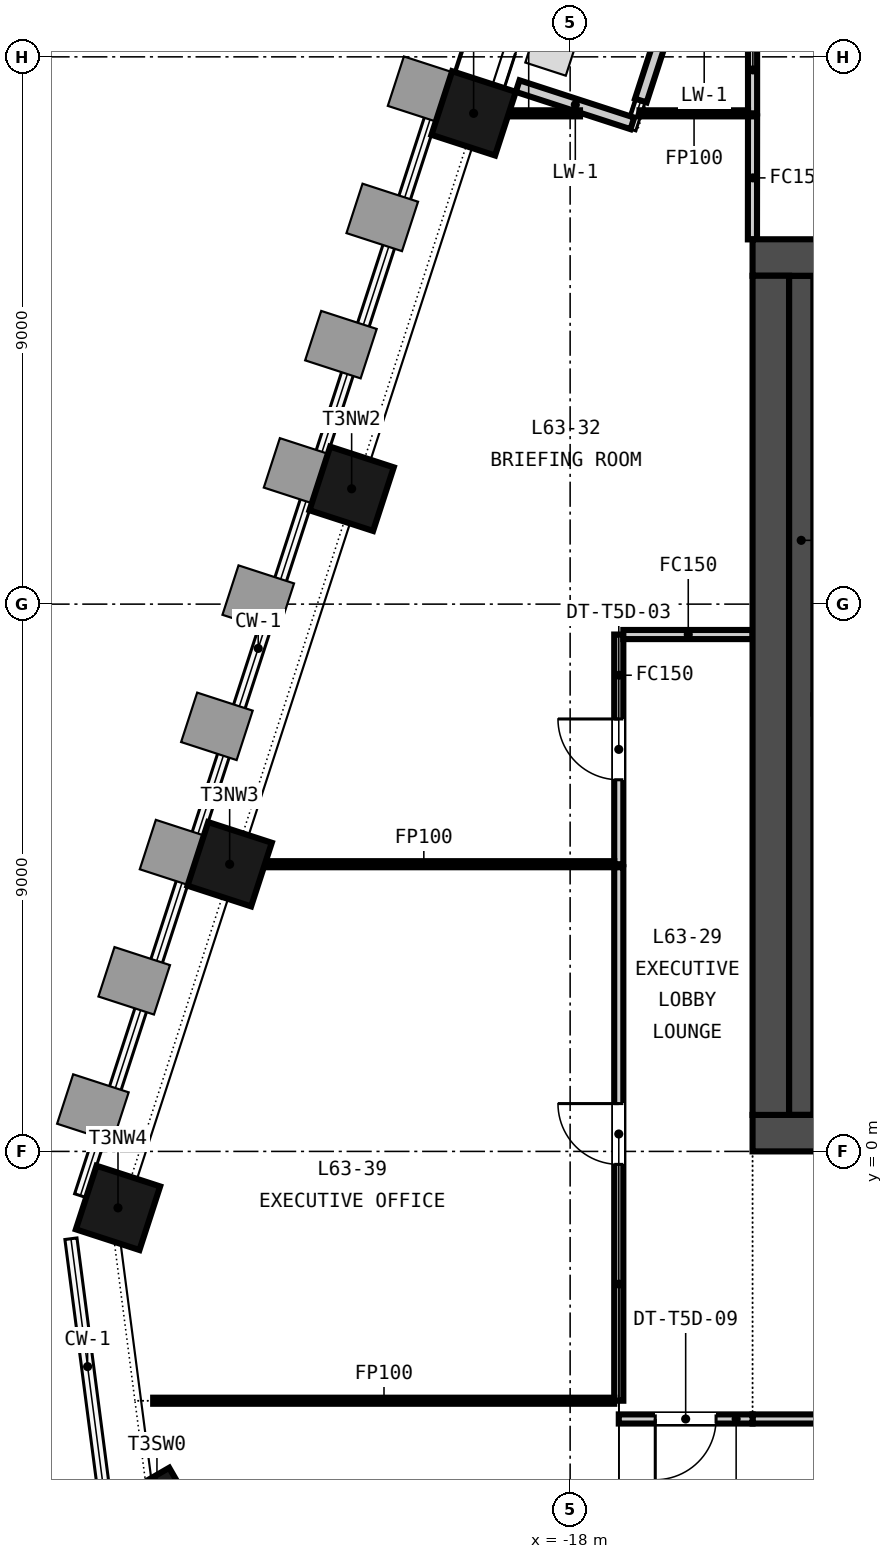
"""IFC4 building model, lengths in metres.
Left out: names, types, materials, properties, quantities, classifications, styles, units other than length and angle.
Written with IfcOpenShell. Run it as: python <this file> out.ifc"""

import sys

from ifc_helpers import new_model, si_unit, direction, frame, frame_2d, origin, origin_2d, place, context, subcontext, project, spatial, rectangle, extrude, element, fill, save


model = new_model("IFC4")
c1 = context("Model", 3, precision=1e-05, world=origin(), true_north=direction((0.0, 1.0)))
c2 = subcontext(c1, "Body", "Model", "MODEL_VIEW")
j1 = project(units=[si_unit("LENGTHUNIT", "METRE"), si_unit("PLANEANGLEUNIT", "RADIAN")], contexts=[c1])
p1 = place(None, origin())
s1 = spatial("IfcSite", under=j1, at=p1, CompositionType="ELEMENT")
p2 = place(p1, origin())
s2 = spatial("IfcBuilding", under=s1, at=p2, CompositionType="ELEMENT")
p3 = place(p2, frame((0.0, 0.0, 249.15)))
s3 = spatial("IfcBuildingStorey", under=s2, at=p3, CompositionType="ELEMENT", Elevation=249.15)
p4 = place(p3, frame((-15.0, 0.3, -0.15), z_axis=(0.0, 0.0, 1.0), x_axis=(1.0, 0.0, 0.0)))
e1 = element("IfcWall", 1, at=p4, inside=s3, PredefinedType="SOLIDWALL", context=c2, shape_type="SweptSolid", body=[
    extrude(rectangle(XDim=30.0, YDim=0.6, at=frame_2d((15.0, 0.0))), origin(), (0.0, 0.0, 1.0), 3.65),
])
p5 = place(p4, frame((5.8, 0.0, 0.15)))
e2 = element("IfcOpeningElement", 2, at=p5, cuts=e1, PredefinedType="OPENING", context=c2, shape_type="SweptSolid", body=[
    extrude(rectangle(XDim=2.4, YDim=2.4, at=frame_2d((1.2, 1.2))), frame((0.0, 0.31, 0.0), z_axis=(0.0, -1.0, 0.0), x_axis=(1.0, 0.0, 0.0)), (0.0, 0.0, 1.0), 0.62),
])
p6 = place(p4, frame((13.8, 0.0, 0.15)))
e3 = element("IfcOpeningElement", 3, at=p6, cuts=e1, PredefinedType="OPENING", context=c2, shape_type="SweptSolid", body=[
    extrude(rectangle(XDim=2.4, YDim=2.4, at=frame_2d((1.2, 1.2))), frame((0.0, 0.31, 0.0), z_axis=(0.0, -1.0, 0.0), x_axis=(1.0, 0.0, 0.0)), (0.0, 0.0, 1.0), 0.62),
])
p7 = place(p4, frame((21.8, 0.0, 0.15)))
e4 = element("IfcOpeningElement", 4, at=p7, cuts=e1, PredefinedType="OPENING", context=c2, shape_type="SweptSolid", body=[
    extrude(rectangle(XDim=2.4, YDim=2.4, at=frame_2d((1.2, 1.2))), frame((0.0, 0.31, 0.0), z_axis=(0.0, -1.0, 0.0), x_axis=(1.0, 0.0, 0.0)), (0.0, 0.0, 1.0), 0.62),
])
p8 = place(p4, frame((1.5, 0.0, 0.15)))
e5 = element("IfcOpeningElement", 5, at=p8, cuts=e1, PredefinedType="OPENING", context=c2, shape_type="SweptSolid", body=[
    extrude(rectangle(XDim=1.2, YDim=2.1, at=frame_2d((0.6, 1.05))), frame((0.0, 0.31, 0.0), z_axis=(0.0, -1.0, 0.0), x_axis=(1.0, 0.0, 0.0)), (0.0, 0.0, 1.0), 0.62),
])
p9 = place(p4, frame((27.3, 0.0, 0.15)))
e6 = element("IfcOpeningElement", 6, at=p9, cuts=e1, PredefinedType="OPENING", context=c2, shape_type="SweptSolid", body=[
    extrude(rectangle(XDim=1.2, YDim=2.1, at=frame_2d((0.6, 1.05))), frame((0.0, 0.31, 0.0), z_axis=(0.0, -1.0, 0.0), x_axis=(1.0, 0.0, 0.0)), (0.0, 0.0, 1.0), 0.62),
])
p10 = place(p3, frame((-15.0, 14.7, -0.15), z_axis=(0.0, 0.0, 1.0), x_axis=(1.0, 0.0, 0.0)))
e7 = element("IfcWall", 7, at=p10, inside=s3, PredefinedType="SOLIDWALL", context=c2, shape_type="SweptSolid", body=[
    extrude(rectangle(XDim=30.0, YDim=0.6, at=frame_2d((15.0, 0.0))), origin(), (0.0, 0.0, 1.0), 3.65),
])
p11 = place(p10, frame((9.25, 0.0, 0.15)))
e8 = element("IfcOpeningElement", 8, at=p11, cuts=e7, PredefinedType="OPENING", context=c2, shape_type="SweptSolid", body=[
    extrude(rectangle(XDim=1.5, YDim=2.1, at=frame_2d((0.75, 1.05))), frame((0.0, 0.31, 0.0), z_axis=(0.0, -1.0, 0.0), x_axis=(1.0, 0.0, 0.0)), (0.0, 0.0, 1.0), 0.62),
])
p12 = place(p10, frame((19.4, 0.0, 0.15)))
e9 = element("IfcOpeningElement", 9, at=p12, cuts=e7, PredefinedType="OPENING", context=c2, shape_type="SweptSolid", body=[
    extrude(rectangle(XDim=1.5, YDim=2.1, at=frame_2d((0.75, 1.05))), frame((0.0, 0.31, 0.0), z_axis=(0.0, -1.0, 0.0), x_axis=(1.0, 0.0, 0.0)), (0.0, 0.0, 1.0), 0.62),
])
p13 = place(p10, frame((1.5, 0.0, 0.15)))
e10 = element("IfcOpeningElement", 10, at=p13, cuts=e7, PredefinedType="OPENING", context=c2, shape_type="SweptSolid", body=[
    extrude(rectangle(XDim=1.2, YDim=2.1, at=frame_2d((0.6, 1.05))), frame((0.0, 0.31, 0.0), z_axis=(0.0, -1.0, 0.0), x_axis=(1.0, 0.0, 0.0)), (0.0, 0.0, 1.0), 0.62),
])
p14 = place(p10, frame((27.3, 0.0, 0.15)))
e11 = element("IfcOpeningElement", 11, at=p14, cuts=e7, PredefinedType="OPENING", context=c2, shape_type="SweptSolid", body=[
    extrude(rectangle(XDim=1.2, YDim=2.1, at=frame_2d((0.6, 1.05))), frame((0.0, 0.31, 0.0), z_axis=(0.0, -1.0, 0.0), x_axis=(1.0, 0.0, 0.0)), (0.0, 0.0, 1.0), 0.62),
])
p15 = place(p3, frame((-14.7, 0.6, -0.15), z_axis=(0.0, 0.0, 1.0), x_axis=(0.0, 1.0, 0.0)))
e12 = element("IfcWall", 12, at=p15, inside=s3, PredefinedType="SOLIDWALL", context=c2, shape_type="SweptSolid", body=[
    extrude(rectangle(XDim=13.8, YDim=0.6, at=frame_2d((6.9, 0.0))), origin(), (0.0, 0.0, 1.0), 3.65),
])
for number, where, z_axis, x_axis in (
    (13, (-19.587, 17.071, -0.15), (0.0, 0.0, 1.0), (-0.309, -0.951, 0.0)),
    (14, (-21.593, 10.897, -0.15), (0.0, 0.0, 1.0), (-0.309, -0.951, 0.0)),
    (15, (-23.599, 4.723, -0.15), (0.0, 0.0, 1.0), (-0.309, -0.951, 0.0)),
    (16, (-25.436, -0.928, -0.15), (0.0, 0.0, 1.0), (-0.309, -0.951, 0.0)),
    (17, (-24.795, -5.954, -0.15), (0.0, 0.0, 1.0), (0.5, -0.866, 0.0)),
):
    element("IfcColumn", number, at=place(p3, frame(where, z_axis=z_axis, x_axis=x_axis)), inside=s3, PredefinedType="COLUMN", context=c2, shape_type="SweptSolid", body=[
        extrude(rectangle(XDim=1.1, YDim=1.1, at=origin_2d()), origin(), (0.0, 0.0, 1.0), 3.65),
    ])
p16 = place(p3, frame((-15.65, 20.935, 0.0), z_axis=(0.0, 0.0, 1.0), x_axis=(-0.308973988745, -0.951070488596, 0.0)))
e18 = element("IfcWall", 18, at=p16, inside=s3, PredefinedType="SOLIDWALL", context=c2, shape_type="SweptSolid", body=[
    extrude(rectangle(XDim=3.842, YDim=0.2, at=frame_2d((1.921, 0.0))), origin(), (0.0, 0.0, 1.0), 3.05),
])
p17 = place(p16, frame((1.021, 0.0, 0.0)))
e19 = element("IfcOpeningElement", 19, at=p17, cuts=e18, PredefinedType="OPENING", context=c2, shape_type="SweptSolid", body=[
    extrude(rectangle(XDim=1.8, YDim=2.4, at=frame_2d((0.9, 1.2))), frame((0.0, 0.11, 0.0), z_axis=(0.0, -1.0, 0.0), x_axis=(1.0, 0.0, 0.0)), (0.0, 0.0, 1.0), 0.22),
])
p18 = place(p3, frame((-18.863, 17.519, 0.0), z_axis=(0.0, 0.0, 1.0), x_axis=(0.951067521568, -0.308983121576, 0.0)))
e20 = element("IfcWall", 20, at=p18, inside=s3, PredefinedType="SOLIDWALL", context=c2, shape_type="SweptSolid", body=[
    extrude(rectangle(XDim=1.984, YDim=0.2, at=frame_2d((0.992, 0.0))), origin(), (0.0, 0.0, 1.0), 2.9),
])
p19 = place(p3, frame((-14.2, 0.6, 0.0), z_axis=(0.0, 0.0, 1.0), x_axis=(0.0, 1.0, 0.0)))
e21 = element("IfcWall", 21, at=p19, inside=s3, PredefinedType="SOLIDWALL", context=c2, shape_type="SweptSolid", body=[
    extrude(rectangle(XDim=13.8, YDim=0.4, at=frame_2d((6.9, 0.0))), origin(), (0.0, 0.0, 1.0), 3.5),
])
p20 = place(p3, frame((-0.867, -4.4, 0.0), z_axis=(0.0, 0.0, 1.0), x_axis=(-1.0, 0.0, 0.0)))
e22 = element("IfcWall", 22, at=p20, inside=s3, PredefinedType="PARTITIONING", context=c2, shape_type="SweptSolid", body=[
    extrude(rectangle(XDim=14.133, YDim=0.15, at=frame_2d((7.066, 0.0))), origin(), (0.0, 0.0, 1.0), 2.751),
])
p21 = place(p20, frame((6.167, 0.0, 0.0)))
e23 = element("IfcOpeningElement", 23, at=p21, cuts=e22, PredefinedType="OPENING", context=c2, shape_type="SweptSolid", body=[
    extrude(rectangle(XDim=1.8, YDim=2.1, at=frame_2d((0.9, 1.05))), frame((0.0, 0.085, 0.0), z_axis=(0.0, -1.0, 0.0), x_axis=(1.0, 0.0, 0.0)), (0.0, 0.0, 1.0), 0.17),
])
p22 = place(p3, frame((-15.0, -4.4, 0.0), z_axis=(0.0, 0.0, 1.0), x_axis=(-1.0, 0.0, 0.0)))
e24 = element("IfcWall", 24, at=p22, inside=s3, PredefinedType="PARTITIONING", context=c2, shape_type="SweptSolid", body=[
    extrude(rectangle(XDim=2.2, YDim=0.15, at=frame_2d((1.1, 0.0))), origin(), (0.0, 0.0, 1.0), 2.751),
])
p23 = place(p22, frame((0.6, 0.0, 0.0)))
e25 = element("IfcOpeningElement", 25, at=p23, cuts=e24, PredefinedType="OPENING", context=c2, shape_type="SweptSolid", body=[
    extrude(rectangle(XDim=1.0, YDim=2.1, at=frame_2d((0.5, 1.05))), frame((0.0, 0.085, 0.0), z_axis=(0.0, -1.0, 0.0), x_axis=(1.0, 0.0, 0.0)), (0.0, 0.0, 1.0), 0.17),
])
p24 = place(p3, frame((-15.0, 17.071, 0.0), z_axis=(0.0, 0.0, 1.0), x_axis=(0.0, 1.0, 0.0)))
e26 = element("IfcWall", 26, at=p24, inside=s3, PredefinedType="PARTITIONING", context=c2, shape_type="SweptSolid", body=[
    extrude(rectangle(XDim=1.429, YDim=0.15, at=frame_2d((0.714, 0.0))), origin(), (0.0, 0.0, 1.0), 2.751),
])
p25 = place(p3, frame((-19.535, 17.071, 0.0), z_axis=(0.0, 0.0, 1.0), x_axis=(1.0, 0.0, 0.0)))
e27 = element("IfcWall", 27, at=p25, inside=s3, PredefinedType="PARTITIONING", context=c2, shape_type="SweptSolid", body=[
    extrude(rectangle(XDim=1.697, YDim=0.1, at=frame_2d((0.849, 0.0))), origin(), (0.0, 0.0, 1.0), 2.751),
])
p26 = place(p3, frame((-16.859, 17.071, 0.0), z_axis=(0.0, 0.0, 1.0), x_axis=(1.0, 0.0, 0.0)))
e28 = element("IfcWall", 28, at=p26, inside=s3, PredefinedType="PARTITIONING", context=c2, shape_type="SweptSolid", body=[
    extrude(rectangle(XDim=1.784, YDim=0.1, at=frame_2d((0.892, 0.0))), origin(), (0.0, 0.0, 1.0), 2.751),
])
p27 = place(p3, frame((-15.002, 14.998, 0.0), z_axis=(0.0, 0.0, 1.0), x_axis=(0.000965483499, 0.999999533921, 0.0)))
e29 = element("IfcWall", 29, at=p27, inside=s3, PredefinedType="PARTITIONING", context=c2, shape_type="SweptSolid", body=[
    extrude(rectangle(XDim=2.023, YDim=0.15, at=frame_2d((1.011, 0.0))), origin(), (0.0, 0.0, 1.0), 2.751),
])
p28 = place(p3, frame((-17.2, 4.723, 0.0), z_axis=(0.0, 0.0, 1.0), x_axis=(0.0, 1.0, 0.0)))
e30 = element("IfcWall", 30, at=p28, inside=s3, PredefinedType="PARTITIONING", context=c2, shape_type="SweptSolid", body=[
    extrude(rectangle(XDim=3.777, YDim=0.15, at=frame_2d((1.889, 0.0))), origin(), (0.0, 0.0, 1.0), 2.751),
])
p29 = place(p28, frame((1.388, 0.0, 0.0)))
e31 = element("IfcOpeningElement", 31, at=p29, cuts=e30, PredefinedType="OPENING", context=c2, shape_type="SweptSolid", body=[
    extrude(rectangle(XDim=1.0, YDim=2.1, at=frame_2d((0.5, 1.05))), frame((0.0, 0.085, 0.0), z_axis=(0.0, -1.0, 0.0), x_axis=(1.0, 0.0, 0.0)), (0.0, 0.0, 1.0), 0.17),
])
p30 = place(p3, frame((-17.125, 8.5, 0.0), z_axis=(0.0, 0.0, 1.0), x_axis=(1.0, 0.0, 0.0)))
e32 = element("IfcWall", 32, at=p30, inside=s3, PredefinedType="PARTITIONING", context=c2, shape_type="SweptSolid", body=[
    extrude(rectangle(XDim=2.125, YDim=0.15, at=frame_2d((1.062, 0.0))), origin(), (0.0, 0.0, 1.0), 2.751),
])
p31 = place(p3, frame((-23.547, 4.723, 0.0), z_axis=(0.0, 0.0, 1.0), x_axis=(1.0, 0.0, 0.0)))
e33 = element("IfcWall", 33, at=p31, inside=s3, PredefinedType="PARTITIONING", context=c2, shape_type="SweptSolid", body=[
    extrude(rectangle(XDim=6.272, YDim=0.1, at=frame_2d((3.136, 0.0))), origin(), (0.0, 0.0, 1.0), 2.751),
])
p32 = place(p3, frame((-17.2, -4.1, 0.0), z_axis=(0.0, 0.0, 1.0), x_axis=(0.0, 1.0, 0.0)))
e34 = element("IfcWall", 34, at=p32, inside=s3, PredefinedType="PARTITIONING", context=c2, shape_type="SweptSolid", body=[
    extrude(rectangle(XDim=8.773, YDim=0.15, at=frame_2d((4.387, 0.0))), origin(), (0.0, 0.0, 1.0), 2.751),
])
p33 = place(p32, frame((3.886, 0.0, 0.0)))
e35 = element("IfcOpeningElement", 35, at=p33, cuts=e34, PredefinedType="OPENING", context=c2, shape_type="SweptSolid", body=[
    extrude(rectangle(XDim=1.0, YDim=2.1, at=frame_2d((0.5, 1.05))), frame((0.0, 0.085, 0.0), z_axis=(0.0, -1.0, 0.0), x_axis=(1.0, 0.0, 0.0)), (0.0, 0.0, 1.0), 0.17),
])
p34 = place(p3, frame((-24.857, -4.1, 0.0), z_axis=(0.0, 0.0, 1.0), x_axis=(1.0, 0.0, 0.0)))
e36 = element("IfcWall", 36, at=p34, inside=s3, PredefinedType="PARTITIONING", context=c2, shape_type="SweptSolid", body=[
    extrude(rectangle(XDim=7.582, YDim=0.1, at=frame_2d((3.791, 0.0))), origin(), (0.0, 0.0, 1.0), 2.751),
])
p35 = place(p29, origin())
e37 = element("IfcDoor", 37, at=p35, inside=s3, OperationType="SINGLE_SWING_RIGHT", PredefinedType="DOOR", context=c2, shape_type="SweptSolid", body=[
    extrude(rectangle(XDim=1.0, YDim=2.1, at=frame_2d((0.5, 1.05))), frame((0.0, 0.025, 0.0), z_axis=(0.0, -1.0, 0.0), x_axis=(1.0, 0.0, 0.0)), (0.0, 0.0, 1.0), 0.05),
])
fill(e31, e37)
p36 = place(p23, origin())
e38 = element("IfcDoor", 38, at=p36, inside=s3, OperationType="SINGLE_SWING_RIGHT", PredefinedType="DOOR", context=c2, shape_type="SweptSolid", body=[
    extrude(rectangle(XDim=1.0, YDim=2.1, at=frame_2d((0.5, 1.05))), frame((0.0, 0.025, 0.0), z_axis=(0.0, -1.0, 0.0), x_axis=(1.0, 0.0, 0.0)), (0.0, 0.0, 1.0), 0.05),
])
fill(e25, e38)
p37 = place(p33, origin())
e39 = element("IfcDoor", 39, at=p37, inside=s3, OperationType="SINGLE_SWING_RIGHT", PredefinedType="DOOR", context=c2, shape_type="SweptSolid", body=[
    extrude(rectangle(XDim=1.0, YDim=2.1, at=frame_2d((0.5, 1.05))), frame((0.0, 0.025, 0.0), z_axis=(0.0, -1.0, 0.0), x_axis=(1.0, 0.0, 0.0)), (0.0, 0.0, 1.0), 0.05),
])
fill(e35, e39)
save(model, sys.argv[1])
